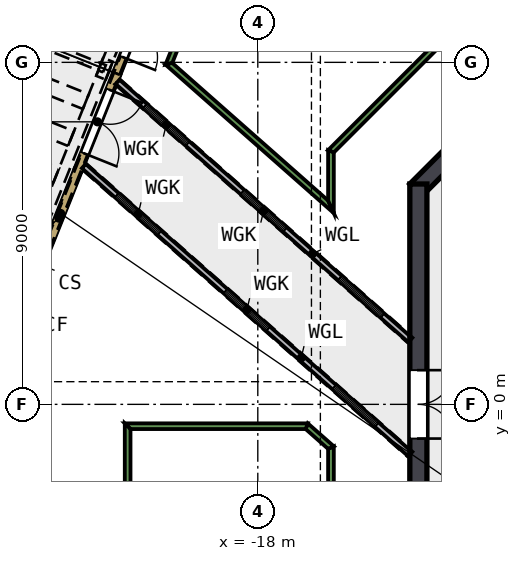
"""IFC4 building model, lengths in metres.
Left out: names, types, materials, properties, quantities, classifications, styles, units other than length and angle.
Written with IfcOpenShell. Run it as: python <this file> out.ifc"""

import sys

from ifc_helpers import new_model, si_unit, direction, frame, frame_2d, origin, place, context, subcontext, project, spatial, polyline, rectangle, outline, extrude, element, fill, save


model = new_model("IFC4")
c1 = context("Model", 3, precision=1e-05, world=origin(), true_north=direction((0.0, 1.0)))
c2 = subcontext(c1, "Body", "Model", "MODEL_VIEW")
j1 = project(units=[si_unit("LENGTHUNIT", "METRE"), si_unit("PLANEANGLEUNIT", "RADIAN")], contexts=[c1])
p1 = place(None, origin())
s1 = spatial("IfcSite", under=j1, at=p1, CompositionType="ELEMENT")
p2 = place(p1, origin())
s2 = spatial("IfcBuilding", under=s1, at=p2, CompositionType="ELEMENT")
p3 = place(p2, frame((0.0, 0.0, 315.0)))
s3 = spatial("IfcBuildingStorey", under=s2, at=p3, CompositionType="ELEMENT", Elevation=315.0)
p4 = place(p3, frame((-5.64, 13.841, 0.0), z_axis=(0.0, 0.0, 1.0), x_axis=(-0.707106781, -0.707106781, 0.0)))
e1 = element("IfcWall", 1, at=p4, inside=s3, PredefinedType="SHEAR", context=c2, shape_type="SweptSolid", body=[
    extrude(rectangle(XDim=11.598, YDim=0.45, at=frame_2d((5.799, 0.0))), origin(), (0.0, 0.0, 1.0), 7.5),
])
p5 = place(p3, frame((-13.775, 5.799, 0.0), z_axis=(0.0, 0.0, 1.0), x_axis=(0.0, -1.0, 0.0)))
e2 = element("IfcWall", 2, at=p5, inside=s3, PredefinedType="SHEAR", context=c2, shape_type="SweptSolid", body=[
    extrude(rectangle(XDim=11.598, YDim=0.45, at=frame_2d((5.799, 0.0))), origin(), (0.0, 0.0, 1.0), 7.5),
])
p6 = place(p5, frame((4.899, 0.0, 0.0)))
e3 = element("IfcOpeningElement", 3, at=p6, cuts=e2, PredefinedType="OPENING", context=c2, shape_type="SweptSolid", body=[
    extrude(rectangle(XDim=1.8, YDim=2.1, at=frame_2d((0.9, 1.05))), frame((0.0, 0.235, 0.0), z_axis=(0.0, -1.0, 0.0), x_axis=(1.0, 0.0, 0.0)), (0.0, 0.0, 1.0), 0.47),
])
p7 = place(p3, frame((-20.697, 11.236, 0.0), z_axis=(0.0, 0.0, 1.0), x_axis=(-0.372038199, -0.92821742, 0.0)))
e4 = element("IfcWall", 4, at=p7, inside=s3, PredefinedType="SOLIDWALL", context=c2, shape_type="SweptSolid", body=[
    extrude(rectangle(XDim=2.73, YDim=0.2, at=frame_2d((1.365, 0.0))), origin(), (0.0, 0.0, 1.0), 2.456),
])
p8 = place(p7, frame((0.465, 0.0, 0.0)))
e5 = element("IfcOpeningElement", 5, at=p8, cuts=e4, PredefinedType="OPENING", context=c2, shape_type="SweptSolid", body=[
    extrude(rectangle(XDim=1.8, YDim=2.1, at=frame_2d((0.9, 1.05))), frame((0.0, 0.11, 0.0), z_axis=(0.0, -1.0, 0.0), x_axis=(1.0, 0.0, 0.0)), (0.0, 0.0, 1.0), 0.22),
])
p9 = place(p3, frame((-20.697, 11.236, 2.71), z_axis=(0.0, 0.0, 1.0), x_axis=(-0.372038199, -0.92821742, 0.0)))
e6 = element("IfcWall", 6, at=p9, inside=s3, PredefinedType="SOLIDWALL", context=c2, shape_type="SweptSolid", body=[
    extrude(rectangle(XDim=2.73, YDim=0.2, at=frame_2d((1.365, 0.0))), origin(), (0.0, 0.0, 1.0), 1.09),
])
p10 = place(p3, frame((-21.712, 8.702, 0.0), z_axis=(0.0, 0.0, 1.0), x_axis=(-0.372007317, -0.928229797, 0.0)))
e7 = element("IfcWall", 7, at=p10, inside=s3, PredefinedType="SOLIDWALL", context=c2, shape_type="SweptSolid", body=[
    extrude(rectangle(XDim=2.73, YDim=0.2, at=frame_2d((1.365, 0.0))), origin(), (0.0, 0.0, 1.0), 2.456),
])
p11 = place(p10, frame((0.465, 0.0, 0.0)))
e8 = element("IfcOpeningElement", 8, at=p11, cuts=e7, PredefinedType="OPENING", context=c2, shape_type="SweptSolid", body=[
    extrude(rectangle(XDim=1.8, YDim=2.1, at=frame_2d((0.9, 1.05))), frame((0.0, 0.11, 0.0), z_axis=(0.0, -1.0, 0.0), x_axis=(1.0, 0.0, 0.0)), (0.0, 0.0, 1.0), 0.22),
])
p12 = place(p3, frame((-21.712, 8.702, 2.71), z_axis=(0.0, 0.0, 1.0), x_axis=(-0.372007317, -0.928229797, 0.0)))
e9 = element("IfcWall", 9, at=p12, inside=s3, PredefinedType="SOLIDWALL", context=c2, shape_type="SweptSolid", body=[
    extrude(rectangle(XDim=2.73, YDim=0.2, at=frame_2d((1.365, 0.0))), origin(), (0.0, 0.0, 1.0), 1.09),
])
p13 = place(p3, frame((-22.728, 6.168, 0.0), z_axis=(0.0, 0.0, 1.0), x_axis=(-0.372038199, -0.92821742, 0.0)))
e10 = element("IfcWall", 10, at=p13, inside=s3, PredefinedType="SOLIDWALL", context=c2, shape_type="SweptSolid", body=[
    extrude(rectangle(XDim=2.73, YDim=0.2, at=frame_2d((1.365, 0.0))), origin(), (0.0, 0.0, 1.0), 2.456),
])
p14 = place(p3, frame((-22.728, 6.168, 2.71), z_axis=(0.0, 0.0, 1.0), x_axis=(-0.372038199, -0.92821742, 0.0)))
e11 = element("IfcWall", 11, at=p14, inside=s3, PredefinedType="SOLIDWALL", context=c2, shape_type="SweptSolid", body=[
    extrude(rectangle(XDim=2.73, YDim=0.2, at=frame_2d((1.365, 0.0))), origin(), (0.0, 0.0, 1.0), 1.09),
])
for number, where, z_axis, x_axis in (
    (12, (-19.681, 13.77, 3.8), (0.0, 0.0, 1.0), (-0.372, -0.928, 0.0)),
    (13, (-23.743, 3.634, 3.8), (0.0, 0.0, 1.0), (0.372, 0.928, 0.0)),
):
    element("IfcWall", number, at=place(p3, frame(where, z_axis=z_axis, x_axis=x_axis)), inside=s3, PredefinedType="SOLIDWALL", context=c2, shape_type="SweptSolid", body=[
        extrude(outline(polyline([(0.0, 0.0), (5.46, 0.0), (5.46, 16.584), (0.0, 1.603), (0.0, 0.0)])), frame((0.0, 0.1, 0.0), z_axis=(0.0, -1.0, 0.0), x_axis=(1.0, 0.0, 0.0)), (0.0, 0.0, 1.0), 0.2),
    ])
p15 = place(p3, frame((-24.844, 3.062, 0.0), z_axis=(0.0, 0.0, 1.0), x_axis=(0.141938054, -0.989875542, 0.0)))
e14 = element("IfcWall", 14, at=p15, inside=s3, PredefinedType="SOLIDWALL", context=c2, shape_type="SweptSolid", body=[
    extrude(rectangle(XDim=13.031, YDim=0.2, at=frame_2d((6.516, 0.0))), origin(), (0.0, 0.0, 1.0), 0.45),
])
p16 = place(p3, origin())
e15 = element("IfcWall", 15, at=p16, inside=s3, PredefinedType="SOLIDWALL", context=c2, shape_type="SweptSolid", body=[
    extrude(outline(polyline([(-16.0, 6.627), (-12.127, 10.5), (-12.49, 10.35), (-16.15, 6.689), (-16.0, 6.627)])), origin(), (0.0, 0.0, 1.0), 0.6),
])
p17 = place(p3, origin())
e16 = element("IfcWall", 16, at=p17, inside=s3, PredefinedType="SOLIDWALL", context=c2, shape_type="SweptSolid", body=[
    extrude(outline(polyline([(-19.804, 10.5), (-20.429, 8.941), (-20.251, 8.983), (-19.703, 10.35), (-19.804, 10.5)])), origin(), (0.0, 0.0, 1.0), 0.6),
])
p18 = place(p3, origin())
e17 = element("IfcWall", 17, at=p18, inside=s3, PredefinedType="SOLIDWALL", context=c2, shape_type="SweptSolid", body=[
    extrude(outline(polyline([(-20.429, 8.941), (-16.0, 5.031), (-16.15, 5.364), (-20.251, 8.983), (-20.429, 8.941)])), origin(), (0.0, 0.0, 1.0), 0.6),
])
p19 = place(p3, origin())
e18 = element("IfcWall", 18, at=p19, inside=s3, PredefinedType="SOLIDWALL", context=c2, shape_type="SweptSolid", body=[
    extrude(outline(polyline([(-16.0, 5.031), (-16.0, 6.627), (-16.15, 6.689), (-16.15, 5.364), (-16.0, 5.031)])), origin(), (0.0, 0.0, 1.0), 0.6),
])
p20 = place(p3, origin())
e19 = element("IfcWall", 19, at=p20, inside=s3, PredefinedType="SOLIDWALL", context=c2, shape_type="SweptSolid", body=[
    extrude(outline(polyline([(-16.0, -6.627), (-16.0, -1.104), (-16.15, -1.172), (-16.15, -6.689), (-16.0, -6.627)])), origin(), (0.0, 0.0, 1.0), 0.6),
])
p21 = place(p3, origin())
e20 = element("IfcWall", 20, at=p21, inside=s3, PredefinedType="SOLIDWALL", context=c2, shape_type="SweptSolid", body=[
    extrude(outline(polyline([(-16.0, -1.104), (-16.684, -0.5), (-16.741, -0.65), (-16.15, -1.172), (-16.0, -1.104)])), origin(), (0.0, 0.0, 1.0), 0.6),
])
p22 = place(p3, origin())
e21 = element("IfcWall", 21, at=p22, inside=s3, PredefinedType="SOLIDWALL", context=c2, shape_type="SweptSolid", body=[
    extrude(outline(polyline([(-16.684, -0.5), (-21.5, -0.5), (-21.35, -0.65), (-16.741, -0.65), (-16.684, -0.5)])), origin(), (0.0, 0.0, 1.0), 0.6),
])
p23 = place(p3, origin())
e22 = element("IfcWall", 22, at=p23, inside=s3, PredefinedType="SOLIDWALL", context=c2, shape_type="SweptSolid", body=[
    extrude(outline(polyline([(-21.5, -0.5), (-21.5, -6.876), (-21.35, -6.865), (-21.35, -0.65), (-21.5, -0.5)])), origin(), (0.0, 0.0, 1.0), 0.6),
])
p24 = place(p3, frame((-14.0, -1.302, 0.0), z_axis=(0.0, 0.0, 1.0), x_axis=(-0.749741338, 0.661731007, 0.0)))
e23 = element("IfcWall", 23, at=p24, inside=s3, PredefinedType="SOLIDWALL", context=c2, shape_type="SweptSolid", body=[
    extrude(rectangle(XDim=11.443, YDim=0.15, at=frame_2d((5.721, 0.0))), origin(), (0.0, 0.0, 1.0), 2.46),
])
p25 = place(p24, frame((1.157, 0.0, 0.9)))
e24 = element("IfcOpeningElement", 24, at=p25, cuts=e23, PredefinedType="OPENING", context=c2, shape_type="SweptSolid", body=[
    extrude(rectangle(XDim=1.5, YDim=1.3, at=frame_2d((0.75, 0.65))), frame((0.0, 0.085, 0.0), z_axis=(0.0, -1.0, 0.0), x_axis=(1.0, 0.0, 0.0)), (0.0, 0.0, 1.0), 0.17),
])
p26 = place(p24, frame((4.971, 0.0, 0.9)))
e25 = element("IfcOpeningElement", 25, at=p26, cuts=e23, PredefinedType="OPENING", context=c2, shape_type="SweptSolid", body=[
    extrude(rectangle(XDim=1.5, YDim=1.3, at=frame_2d((0.75, 0.65))), frame((0.0, 0.085, 0.0), z_axis=(0.0, -1.0, 0.0), x_axis=(1.0, 0.0, 0.0)), (0.0, 0.0, 1.0), 0.17),
])
p27 = place(p24, frame((8.786, 0.0, 0.9)))
e26 = element("IfcOpeningElement", 26, at=p27, cuts=e23, PredefinedType="OPENING", context=c2, shape_type="SweptSolid", body=[
    extrude(rectangle(XDim=1.5, YDim=1.3, at=frame_2d((0.75, 0.65))), frame((0.0, 0.085, 0.0), z_axis=(0.0, -1.0, 0.0), x_axis=(1.0, 0.0, 0.0)), (0.0, 0.0, 1.0), 0.17),
])
p28 = place(p3, frame((-14.0, 1.699, 0.0), z_axis=(0.0, 0.0, 1.0), x_axis=(-0.749755194, 0.661715308, 0.0)))
e27 = element("IfcWall", 27, at=p28, inside=s3, PredefinedType="SOLIDWALL", context=c2, shape_type="SweptSolid", body=[
    extrude(rectangle(XDim=10.258, YDim=0.15, at=frame_2d((5.129, 0.0))), origin(), (0.0, 0.0, 1.0), 2.46),
])
p29 = place(p28, frame((0.96, 0.0, 0.9)))
e28 = element("IfcOpeningElement", 28, at=p29, cuts=e27, PredefinedType="OPENING", context=c2, shape_type="SweptSolid", body=[
    extrude(rectangle(XDim=1.5, YDim=1.3, at=frame_2d((0.75, 0.65))), frame((0.0, 0.085, 0.0), z_axis=(0.0, -1.0, 0.0), x_axis=(1.0, 0.0, 0.0)), (0.0, 0.0, 1.0), 0.17),
])
p30 = place(p28, frame((4.379, 0.0, 0.9)))
e29 = element("IfcOpeningElement", 29, at=p30, cuts=e27, PredefinedType="OPENING", context=c2, shape_type="SweptSolid", body=[
    extrude(rectangle(XDim=1.5, YDim=1.3, at=frame_2d((0.75, 0.65))), frame((0.0, 0.085, 0.0), z_axis=(0.0, -1.0, 0.0), x_axis=(1.0, 0.0, 0.0)), (0.0, 0.0, 1.0), 0.17),
])
p31 = place(p28, frame((7.798, 0.0, 0.9)))
e30 = element("IfcOpeningElement", 30, at=p31, cuts=e27, PredefinedType="OPENING", context=c2, shape_type="SweptSolid", body=[
    extrude(rectangle(XDim=1.5, YDim=1.3, at=frame_2d((0.75, 0.65))), frame((0.0, 0.085, 0.0), z_axis=(0.0, -1.0, 0.0), x_axis=(1.0, 0.0, 0.0)), (0.0, 0.0, 1.0), 0.17),
])
p32 = place(p8, origin())
e31 = element("IfcDoor", 31, at=p32, inside=s3, OperationType="DOUBLE_DOOR_SINGLE_SWING", PredefinedType="DOOR", context=c2, shape_type="SweptSolid", body=[
    extrude(rectangle(XDim=1.8, YDim=2.1, at=frame_2d((0.9, 1.05))), frame((0.0, 0.025, 0.0), z_axis=(0.0, -1.0, 0.0), x_axis=(1.0, 0.0, 0.0)), (0.0, 0.0, 1.0), 0.05),
])
fill(e5, e31)
p33 = place(p11, origin())
e32 = element("IfcDoor", 32, at=p33, inside=s3, OperationType="DOUBLE_DOOR_SINGLE_SWING", PredefinedType="DOOR", context=c2, shape_type="SweptSolid", body=[
    extrude(rectangle(XDim=1.8, YDim=2.1, at=frame_2d((0.9, 1.05))), frame((0.0, 0.025, 0.0), z_axis=(0.0, -1.0, 0.0), x_axis=(1.0, 0.0, 0.0)), (0.0, 0.0, 1.0), 0.05),
])
fill(e8, e32)
p34 = place(p25, origin())
e33 = element("IfcWindow", 33, at=p34, inside=s3, PartitioningType="SINGLE_PANEL", PredefinedType="WINDOW", context=c2, shape_type="SweptSolid", body=[
    extrude(rectangle(XDim=1.5, YDim=1.3, at=frame_2d((0.75, 0.65))), frame((0.0, 0.03, 0.0), z_axis=(0.0, -1.0, 0.0), x_axis=(1.0, 0.0, 0.0)), (0.0, 0.0, 1.0), 0.06),
])
fill(e24, e33)
p35 = place(p26, origin())
e34 = element("IfcWindow", 34, at=p35, inside=s3, PartitioningType="SINGLE_PANEL", PredefinedType="WINDOW", context=c2, shape_type="SweptSolid", body=[
    extrude(rectangle(XDim=1.5, YDim=1.3, at=frame_2d((0.75, 0.65))), frame((0.0, 0.03, 0.0), z_axis=(0.0, -1.0, 0.0), x_axis=(1.0, 0.0, 0.0)), (0.0, 0.0, 1.0), 0.06),
])
fill(e25, e34)
p36 = place(p27, origin())
e35 = element("IfcWindow", 35, at=p36, inside=s3, PartitioningType="SINGLE_PANEL", PredefinedType="WINDOW", context=c2, shape_type="SweptSolid", body=[
    extrude(rectangle(XDim=1.5, YDim=1.3, at=frame_2d((0.75, 0.65))), frame((0.0, 0.03, 0.0), z_axis=(0.0, -1.0, 0.0), x_axis=(1.0, 0.0, 0.0)), (0.0, 0.0, 1.0), 0.06),
])
fill(e26, e35)
p37 = place(p29, origin())
e36 = element("IfcWindow", 36, at=p37, inside=s3, PartitioningType="SINGLE_PANEL", PredefinedType="WINDOW", context=c2, shape_type="SweptSolid", body=[
    extrude(rectangle(XDim=1.5, YDim=1.3, at=frame_2d((0.75, 0.65))), frame((0.0, 0.03, 0.0), z_axis=(0.0, -1.0, 0.0), x_axis=(1.0, 0.0, 0.0)), (0.0, 0.0, 1.0), 0.06),
])
fill(e28, e36)
p38 = place(p30, origin())
e37 = element("IfcWindow", 37, at=p38, inside=s3, PartitioningType="SINGLE_PANEL", PredefinedType="WINDOW", context=c2, shape_type="SweptSolid", body=[
    extrude(rectangle(XDim=1.5, YDim=1.3, at=frame_2d((0.75, 0.65))), frame((0.0, 0.03, 0.0), z_axis=(0.0, -1.0, 0.0), x_axis=(1.0, 0.0, 0.0)), (0.0, 0.0, 1.0), 0.06),
])
fill(e29, e37)
p39 = place(p31, origin())
e38 = element("IfcWindow", 38, at=p39, inside=s3, PartitioningType="SINGLE_PANEL", PredefinedType="WINDOW", context=c2, shape_type="SweptSolid", body=[
    extrude(rectangle(XDim=1.5, YDim=1.3, at=frame_2d((0.75, 0.65))), frame((0.0, 0.03, 0.0), z_axis=(0.0, -1.0, 0.0), x_axis=(1.0, 0.0, 0.0)), (0.0, 0.0, 1.0), 0.06),
])
fill(e30, e38)
p40 = place(p6, origin())
e39 = element("IfcDoor", 39, at=p40, inside=s3, OperationType="DOUBLE_DOOR_SINGLE_SWING", PredefinedType="DOOR", context=c2, shape_type="SweptSolid", body=[
    extrude(rectangle(XDim=1.8, YDim=2.1, at=frame_2d((0.9, 1.05))), frame((0.0, 0.025, 0.0), z_axis=(0.0, -1.0, 0.0), x_axis=(1.0, 0.0, 0.0)), (0.0, 0.0, 1.0), 0.05),
])
fill(e3, e39)
save(model, sys.argv[1])
